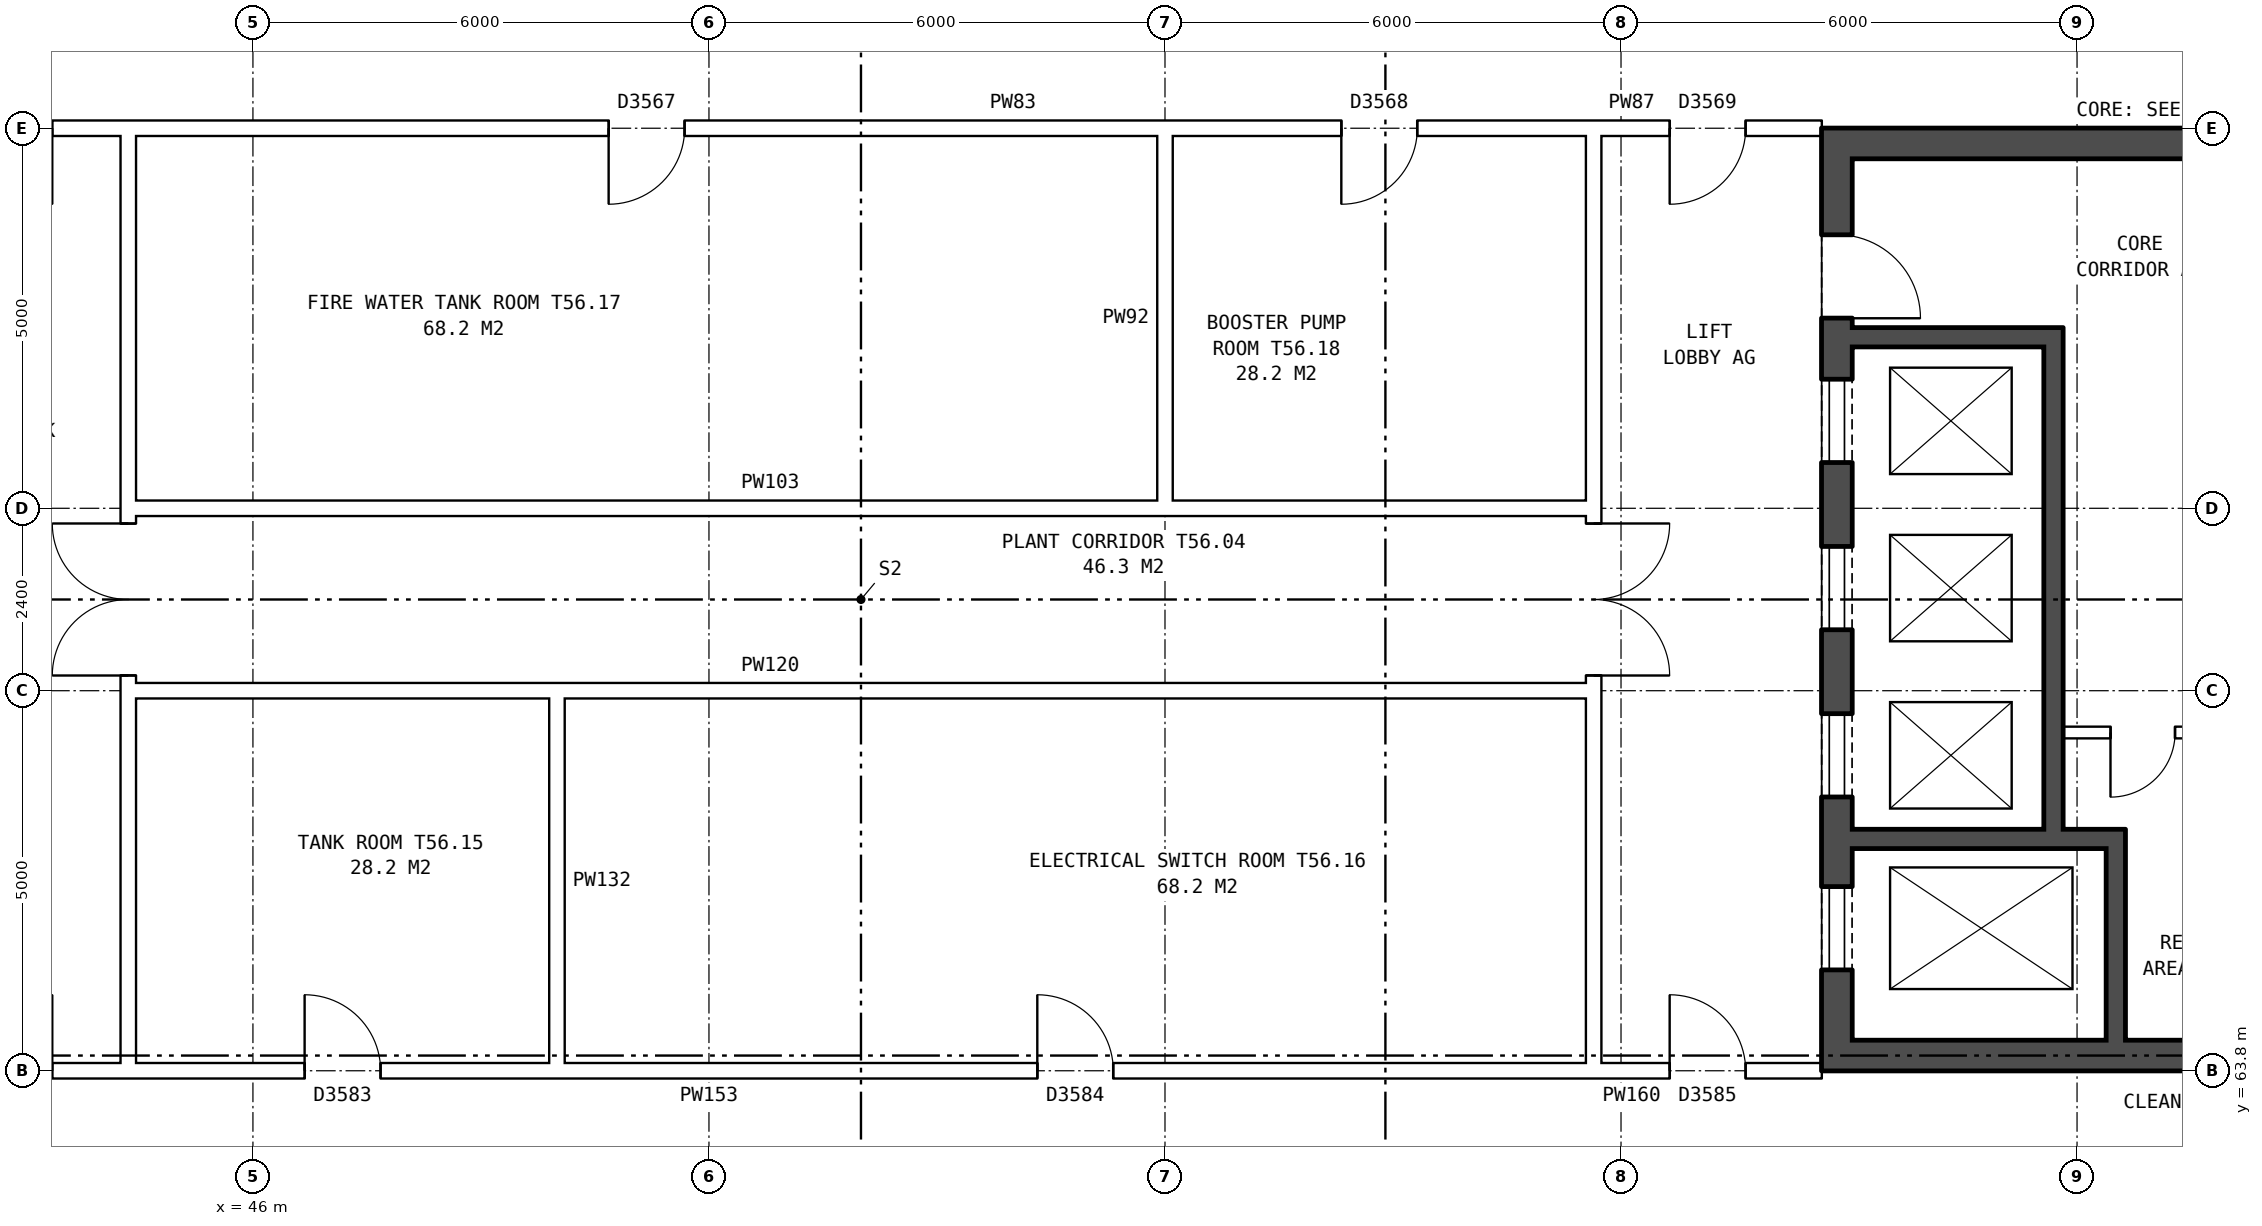
"""IFC4 building model, lengths in metres.
Left out: names, types, materials, properties, quantities, classifications, styles, units other than length and angle.
Written with IfcOpenShell. Run it as: python <this file> out.ifc"""

import sys

from ifc_helpers import new_model, si_unit, direction, frame, frame_2d, origin, place, context, subcontext, project, spatial, rectangle, extrude, element, fill, save


model = new_model("IFC4")
c1 = context("Model", 3, precision=1e-05, world=origin(), true_north=direction((0.0, 1.0)))
c2 = subcontext(c1, "Body", "Model", "MODEL_VIEW")
j1 = project(units=[si_unit("LENGTHUNIT", "METRE"), si_unit("PLANEANGLEUNIT", "RADIAN")], contexts=[c1])
p1 = place(None, origin())
s1 = spatial("IfcSite", under=j1, at=p1, CompositionType="ELEMENT")
p2 = place(p1, origin())
s2 = spatial("IfcBuilding", under=s1, at=p2, CompositionType="ELEMENT")
p3 = place(p2, frame((0.0, 0.0, 198.6)))
s3 = spatial("IfcBuildingStorey", under=s2, at=p3, CompositionType="ELEMENT", Elevation=198.6)
p4 = place(p3, frame((66.84, 63.8, 0.0), z_axis=(0.0, 0.0, 1.0), x_axis=(0.0, 1.0, 0.0)))
e1 = element("IfcWall", 1, at=p4, inside=s3, PredefinedType="SHEAR", context=c2, shape_type="SweptSolid", body=[
    extrude(rectangle(XDim=12.4, YDim=0.4, at=frame_2d((6.2, 0.0))), origin(), (0.0, 0.0, 1.0), 3.7),
])
p5 = place(p4, frame((1.325, 0.0, 0.0)))
e2 = element("IfcOpeningElement", 2, at=p5, cuts=e1, PredefinedType="OPENING", context=c2, shape_type="SweptSolid", body=[
    extrude(rectangle(XDim=1.1, YDim=2.1, at=frame_2d((0.55, 1.05))), frame((0.0, 0.21, 0.0), z_axis=(0.0, -1.0, 0.0), x_axis=(1.0, 0.0, 0.0)), (0.0, 0.0, 1.0), 0.42),
])
p6 = place(p4, frame((3.6, 0.0, 0.0)))
e3 = element("IfcOpeningElement", 3, at=p6, cuts=e1, PredefinedType="OPENING", context=c2, shape_type="SweptSolid", body=[
    extrude(rectangle(XDim=1.1, YDim=2.1, at=frame_2d((0.55, 1.05))), frame((0.0, 0.21, 0.0), z_axis=(0.0, -1.0, 0.0), x_axis=(1.0, 0.0, 0.0)), (0.0, 0.0, 1.0), 0.42),
])
p7 = place(p4, frame((5.8, 0.0, 0.0)))
e4 = element("IfcOpeningElement", 4, at=p7, cuts=e1, PredefinedType="OPENING", context=c2, shape_type="SweptSolid", body=[
    extrude(rectangle(XDim=1.1, YDim=2.1, at=frame_2d((0.55, 1.05))), frame((0.0, 0.21, 0.0), z_axis=(0.0, -1.0, 0.0), x_axis=(1.0, 0.0, 0.0)), (0.0, 0.0, 1.0), 0.42),
])
p8 = place(p4, frame((8.0, 0.0, 0.0)))
e5 = element("IfcOpeningElement", 5, at=p8, cuts=e1, PredefinedType="OPENING", context=c2, shape_type="SweptSolid", body=[
    extrude(rectangle(XDim=1.1, YDim=2.1, at=frame_2d((0.55, 1.05))), frame((0.0, 0.21, 0.0), z_axis=(0.0, -1.0, 0.0), x_axis=(1.0, 0.0, 0.0)), (0.0, 0.0, 1.0), 0.42),
])
p9 = place(p4, frame((9.9, 0.0, 0.0)))
e6 = element("IfcOpeningElement", 6, at=p9, cuts=e1, PredefinedType="OPENING", context=c2, shape_type="SweptSolid", body=[
    extrude(rectangle(XDim=1.1, YDim=2.1, at=frame_2d((0.55, 1.05))), frame((0.0, 0.21, 0.0), z_axis=(0.0, -1.0, 0.0), x_axis=(1.0, 0.0, 0.0)), (0.0, 0.0, 1.0), 0.42),
])
for number, where, z_axis, x_axis in (
    (7, (67.04, 64.0, 0.0), (0.0, 0.0, 1.0), (1.0, 0.0, 0.0)),
    (8, (67.04, 76.0, 0.0), (0.0, 0.0, 1.0), (1.0, 0.0, 0.0)),
):
    element("IfcWall", number, at=place(p3, frame(where, z_axis=z_axis, x_axis=x_axis)), inside=s3, PredefinedType="SHEAR", context=c2, shape_type="SweptSolid", body=[
        extrude(rectangle(XDim=8.2, YDim=0.4, at=frame_2d((4.1, 0.0))), origin(), (0.0, 0.0, 1.0), 3.7),
    ])
p10 = place(p3, frame((67.04, 66.85, 0.0), z_axis=(0.0, 0.0, 1.0), x_axis=(1.0, 0.0, 0.0)))
e9 = element("IfcWall", 9, at=p10, inside=s3, PredefinedType="SHEAR", context=c2, shape_type="SweptSolid", body=[
    extrude(rectangle(XDim=3.595, YDim=0.25, at=frame_2d((1.797, 0.0))), origin(), (0.0, 0.0, 1.0), 3.7),
])
p11 = place(p3, frame((69.815, 68.25, 0.0), z_axis=(0.0, 0.0, 1.0), x_axis=(1.0, 0.0, 0.0)))
e10 = element("IfcWall", 10, at=p11, inside=s3, PredefinedType="PARTITIONING", context=c2, shape_type="SweptSolid", body=[
    extrude(rectangle(XDim=2.1, YDim=0.15, at=frame_2d((1.05, 0.0))), origin(), (0.0, 0.0, 1.0), 3.7),
])
p12 = place(p11, frame((0.625, 0.0, 0.0)))
e11 = element("IfcOpeningElement", 11, at=p12, cuts=e10, PredefinedType="OPENING", context=c2, shape_type="SweptSolid", body=[
    extrude(rectangle(XDim=0.85, YDim=2.1, at=frame_2d((0.425, 1.05))), frame((0.0, 0.085, 0.0), z_axis=(0.0, -1.0, 0.0), x_axis=(1.0, 0.0, 0.0)), (0.0, 0.0, 1.0), 0.17),
])
p13 = place(p3, frame((67.04, 73.45, 0.0), z_axis=(0.0, 0.0, 1.0), x_axis=(1.0, 0.0, 0.0)))
e12 = element("IfcWall", 12, at=p13, inside=s3, PredefinedType="SHEAR", context=c2, shape_type="SweptSolid", body=[
    extrude(rectangle(XDim=2.525, YDim=0.25, at=frame_2d((1.262, 0.0))), origin(), (0.0, 0.0, 1.0), 3.7),
])
p14 = place(p3, frame((69.69, 66.975, 0.0), z_axis=(0.0, 0.0, 1.0), x_axis=(0.0, 1.0, 0.0)))
e13 = element("IfcWall", 13, at=p14, inside=s3, PredefinedType="SHEAR", context=c2, shape_type="SweptSolid", body=[
    extrude(rectangle(XDim=6.6, YDim=0.25, at=frame_2d((3.3, 0.0))), origin(), (0.0, 0.0, 1.0), 3.7),
])
p15 = place(p3, frame((70.51, 64.2, 0.0), z_axis=(0.0, 0.0, 1.0), x_axis=(0.0, 1.0, 0.0)))
e14 = element("IfcWall", 14, at=p15, inside=s3, PredefinedType="SHEAR", context=c2, shape_type="SweptSolid", body=[
    extrude(rectangle(XDim=2.525, YDim=0.25, at=frame_2d((1.263, 0.0))), origin(), (0.0, 0.0, 1.0), 3.7),
])
p16 = place(p3, frame((63.64, 63.9, 0.0), z_axis=(0.0, 0.0, 1.0), x_axis=(0.0, 1.0, 0.0)))
e15 = element("IfcWall", 15, at=p16, inside=s3, PredefinedType="PARTITIONING", context=c2, shape_type="SweptSolid", body=[
    extrude(rectangle(XDim=12.2, YDim=0.2, at=frame_2d((6.1, 0.0))), origin(), (0.0, 0.0, 1.0), 3.7),
])
p17 = place(p16, frame((5.1, 0.0, 0.0)))
e16 = element("IfcOpeningElement", 16, at=p17, cuts=e15, PredefinedType="OPENING", context=c2, shape_type="SweptSolid", body=[
    extrude(rectangle(XDim=2.0, YDim=2.1, at=frame_2d((1.0, 1.05))), frame((0.0, 0.11, 0.0), z_axis=(0.0, -1.0, 0.0), x_axis=(1.0, 0.0, 0.0)), (0.0, 0.0, 1.0), 0.22),
])
p18 = place(p3, frame((44.36, 63.9, 0.0), z_axis=(0.0, 0.0, 1.0), x_axis=(0.0, 1.0, 0.0)))
e17 = element("IfcWall", 17, at=p18, inside=s3, PredefinedType="PARTITIONING", context=c2, shape_type="SweptSolid", body=[
    extrude(rectangle(XDim=12.2, YDim=0.2, at=frame_2d((6.1, 0.0))), origin(), (0.0, 0.0, 1.0), 3.7),
])
p19 = place(p18, frame((5.1, 0.0, 0.0)))
e18 = element("IfcOpeningElement", 18, at=p19, cuts=e17, PredefinedType="OPENING", context=c2, shape_type="SweptSolid", body=[
    extrude(rectangle(XDim=2.0, YDim=2.1, at=frame_2d((1.0, 1.05))), frame((0.0, 0.11, 0.0), z_axis=(0.0, -1.0, 0.0), x_axis=(1.0, 0.0, 0.0)), (0.0, 0.0, 1.0), 0.22),
])
p20 = place(p3, frame((44.36, 63.8, 0.0), z_axis=(0.0, 0.0, 1.0), x_axis=(1.0, 0.0, 0.0)))
e19 = element("IfcWall", 19, at=p20, inside=s3, PredefinedType="PARTITIONING", context=c2, shape_type="SweptSolid", body=[
    extrude(rectangle(XDim=19.28, YDim=0.2, at=frame_2d((9.64, 0.0))), origin(), (0.0, 0.0, 1.0), 3.7),
])
p21 = place(p20, frame((2.32, 0.0, 0.0)))
e20 = element("IfcOpeningElement", 20, at=p21, cuts=e19, PredefinedType="OPENING", context=c2, shape_type="SweptSolid", body=[
    extrude(rectangle(XDim=1.0, YDim=2.1, at=frame_2d((0.5, 1.05))), frame((0.0, 0.11, 0.0), z_axis=(0.0, -1.0, 0.0), x_axis=(1.0, 0.0, 0.0)), (0.0, 0.0, 1.0), 0.22),
])
p22 = place(p20, frame((11.96, 0.0, 0.0)))
e21 = element("IfcOpeningElement", 21, at=p22, cuts=e19, PredefinedType="OPENING", context=c2, shape_type="SweptSolid", body=[
    extrude(rectangle(XDim=1.0, YDim=2.1, at=frame_2d((0.5, 1.05))), frame((0.0, 0.11, 0.0), z_axis=(0.0, -1.0, 0.0), x_axis=(1.0, 0.0, 0.0)), (0.0, 0.0, 1.0), 0.22),
])
p23 = place(p3, frame((41.36, 63.8, 0.0), z_axis=(0.0, 0.0, 1.0), x_axis=(1.0, 0.0, 0.0)))
e22 = element("IfcWall", 22, at=p23, inside=s3, PredefinedType="PARTITIONING", context=c2, shape_type="SweptSolid", body=[
    extrude(rectangle(XDim=3.0, YDim=0.2, at=frame_2d((1.5, 0.0))), origin(), (0.0, 0.0, 1.0), 3.7),
])
p24 = place(p23, frame((1.0, 0.0, 0.0)))
e23 = element("IfcOpeningElement", 23, at=p24, cuts=e22, PredefinedType="OPENING", context=c2, shape_type="SweptSolid", body=[
    extrude(rectangle(XDim=1.0, YDim=2.1, at=frame_2d((0.5, 1.05))), frame((0.0, 0.11, 0.0), z_axis=(0.0, -1.0, 0.0), x_axis=(1.0, 0.0, 0.0)), (0.0, 0.0, 1.0), 0.22),
])
p25 = place(p3, frame((63.64, 63.8, 0.0), z_axis=(0.0, 0.0, 1.0), x_axis=(1.0, 0.0, 0.0)))
e24 = element("IfcWall", 24, at=p25, inside=s3, PredefinedType="PARTITIONING", context=c2, shape_type="SweptSolid", body=[
    extrude(rectangle(XDim=3.0, YDim=0.2, at=frame_2d((1.5, 0.0))), origin(), (0.0, 0.0, 1.0), 3.7),
])
p26 = place(p25, frame((1.0, 0.0, 0.0)))
e25 = element("IfcOpeningElement", 25, at=p26, cuts=e24, PredefinedType="OPENING", context=c2, shape_type="SweptSolid", body=[
    extrude(rectangle(XDim=1.0, YDim=2.1, at=frame_2d((0.5, 1.05))), frame((0.0, 0.11, 0.0), z_axis=(0.0, -1.0, 0.0), x_axis=(1.0, 0.0, 0.0)), (0.0, 0.0, 1.0), 0.22),
])
for number, where, z_axis, x_axis in (
    (26, (44.36, 68.8, 0.0), (0.0, 0.0, 1.0), (1.0, 0.0, 0.0)),
    (27, (44.36, 71.2, 0.0), (0.0, 0.0, 1.0), (1.0, 0.0, 0.0)),
):
    element("IfcWall", number, at=place(p3, frame(where, z_axis=z_axis, x_axis=x_axis)), inside=s3, PredefinedType="PARTITIONING", context=c2, shape_type="SweptSolid", body=[
        extrude(rectangle(XDim=19.28, YDim=0.2, at=frame_2d((9.64, 0.0))), origin(), (0.0, 0.0, 1.0), 3.7),
    ])
p27 = place(p3, frame((44.36, 76.2, 0.0), z_axis=(0.0, 0.0, 1.0), x_axis=(1.0, 0.0, 0.0)))
e28 = element("IfcWall", 28, at=p27, inside=s3, PredefinedType="PARTITIONING", context=c2, shape_type="SweptSolid", body=[
    extrude(rectangle(XDim=19.28, YDim=0.2, at=frame_2d((9.64, 0.0))), origin(), (0.0, 0.0, 1.0), 3.7),
])
p28 = place(p27, frame((6.32, 0.0, 0.0)))
e29 = element("IfcOpeningElement", 29, at=p28, cuts=e28, PredefinedType="OPENING", context=c2, shape_type="SweptSolid", body=[
    extrude(rectangle(XDim=1.0, YDim=2.1, at=frame_2d((0.5, 1.05))), frame((0.0, 0.11, 0.0), z_axis=(0.0, -1.0, 0.0), x_axis=(1.0, 0.0, 0.0)), (0.0, 0.0, 1.0), 0.22),
])
p29 = place(p27, frame((15.96, 0.0, 0.0)))
e30 = element("IfcOpeningElement", 30, at=p29, cuts=e28, PredefinedType="OPENING", context=c2, shape_type="SweptSolid", body=[
    extrude(rectangle(XDim=1.0, YDim=2.1, at=frame_2d((0.5, 1.05))), frame((0.0, 0.11, 0.0), z_axis=(0.0, -1.0, 0.0), x_axis=(1.0, 0.0, 0.0)), (0.0, 0.0, 1.0), 0.22),
])
p30 = place(p3, frame((41.36, 76.2, 0.0), z_axis=(0.0, 0.0, 1.0), x_axis=(1.0, 0.0, 0.0)))
e31 = element("IfcWall", 31, at=p30, inside=s3, PredefinedType="PARTITIONING", context=c2, shape_type="SweptSolid", body=[
    extrude(rectangle(XDim=3.0, YDim=0.2, at=frame_2d((1.5, 0.0))), origin(), (0.0, 0.0, 1.0), 3.7),
])
p31 = place(p30, frame((1.0, 0.0, 0.0)))
e32 = element("IfcOpeningElement", 32, at=p31, cuts=e31, PredefinedType="OPENING", context=c2, shape_type="SweptSolid", body=[
    extrude(rectangle(XDim=1.0, YDim=2.1, at=frame_2d((0.5, 1.05))), frame((0.0, 0.11, 0.0), z_axis=(0.0, -1.0, 0.0), x_axis=(1.0, 0.0, 0.0)), (0.0, 0.0, 1.0), 0.22),
])
p32 = place(p3, frame((63.64, 76.2, 0.0), z_axis=(0.0, 0.0, 1.0), x_axis=(1.0, 0.0, 0.0)))
e33 = element("IfcWall", 33, at=p32, inside=s3, PredefinedType="PARTITIONING", context=c2, shape_type="SweptSolid", body=[
    extrude(rectangle(XDim=3.0, YDim=0.2, at=frame_2d((1.5, 0.0))), origin(), (0.0, 0.0, 1.0), 3.7),
])
p33 = place(p32, frame((1.0, 0.0, 0.0)))
e34 = element("IfcOpeningElement", 34, at=p33, cuts=e33, PredefinedType="OPENING", context=c2, shape_type="SweptSolid", body=[
    extrude(rectangle(XDim=1.0, YDim=2.1, at=frame_2d((0.5, 1.05))), frame((0.0, 0.11, 0.0), z_axis=(0.0, -1.0, 0.0), x_axis=(1.0, 0.0, 0.0)), (0.0, 0.0, 1.0), 0.22),
])
for number, where, z_axis, x_axis in (
    (35, (50.0, 63.7, 0.0), (0.0, 0.0, 1.0), (0.0, 1.0, 0.0)),
    (36, (58.0, 71.1, 0.0), (0.0, 0.0, 1.0), (0.0, 1.0, 0.0)),
):
    element("IfcWall", number, at=place(p3, frame(where, z_axis=z_axis, x_axis=x_axis)), inside=s3, PredefinedType="PARTITIONING", context=c2, shape_type="SweptSolid", body=[
        extrude(rectangle(XDim=5.2, YDim=0.2, at=frame_2d((2.6, 0.0))), origin(), (0.0, 0.0, 1.0), 3.7),
    ])
p34 = place(p5, origin())
e37 = element("IfcDoor", 37, at=p34, inside=s3, OperationType="DOUBLE_DOOR_SLIDING", PredefinedType="DOOR", context=c2, shape_type="SweptSolid", body=[
    extrude(rectangle(XDim=1.1, YDim=2.1, at=frame_2d((0.55, 1.05))), frame((0.0, -0.135, 0.0), z_axis=(0.0, -1.0, 0.0), x_axis=(1.0, 0.0, 0.0)), (0.0, 0.0, 1.0), 0.05),
])
fill(e2, e37)
p35 = place(p6, origin())
e38 = element("IfcDoor", 38, at=p35, inside=s3, OperationType="DOUBLE_DOOR_SLIDING", PredefinedType="DOOR", context=c2, shape_type="SweptSolid", body=[
    extrude(rectangle(XDim=1.1, YDim=2.1, at=frame_2d((0.55, 1.05))), frame((0.0, -0.135, 0.0), z_axis=(0.0, -1.0, 0.0), x_axis=(1.0, 0.0, 0.0)), (0.0, 0.0, 1.0), 0.05),
])
fill(e3, e38)
p36 = place(p7, origin())
e39 = element("IfcDoor", 39, at=p36, inside=s3, OperationType="DOUBLE_DOOR_SLIDING", PredefinedType="DOOR", context=c2, shape_type="SweptSolid", body=[
    extrude(rectangle(XDim=1.1, YDim=2.1, at=frame_2d((0.55, 1.05))), frame((0.0, -0.135, 0.0), z_axis=(0.0, -1.0, 0.0), x_axis=(1.0, 0.0, 0.0)), (0.0, 0.0, 1.0), 0.05),
])
fill(e4, e39)
p37 = place(p8, origin())
e40 = element("IfcDoor", 40, at=p37, inside=s3, OperationType="DOUBLE_DOOR_SLIDING", PredefinedType="DOOR", context=c2, shape_type="SweptSolid", body=[
    extrude(rectangle(XDim=1.1, YDim=2.1, at=frame_2d((0.55, 1.05))), frame((0.0, -0.135, 0.0), z_axis=(0.0, -1.0, 0.0), x_axis=(1.0, 0.0, 0.0)), (0.0, 0.0, 1.0), 0.05),
])
fill(e5, e40)
p38 = place(p9, frame((1.1, 0.0, 0.0), z_axis=(0.0, 0.0, 1.0), x_axis=(-1.0, 0.0, 0.0)))
e41 = element("IfcDoor", 41, at=p38, inside=s3, OperationType="SINGLE_SWING_RIGHT", PredefinedType="DOOR", context=c2, shape_type="SweptSolid", body=[
    extrude(rectangle(XDim=1.1, YDim=2.1, at=frame_2d((0.55, 1.05))), frame((0.0, 0.185, 0.0), z_axis=(0.0, -1.0, 0.0), x_axis=(1.0, 0.0, 0.0)), (0.0, 0.0, 1.0), 0.05),
])
fill(e6, e41)
p39 = place(p12, frame((0.85, 0.0, 0.0), z_axis=(0.0, 0.0, 1.0), x_axis=(-1.0, 0.0, 0.0)))
e42 = element("IfcDoor", 42, at=p39, inside=s3, OperationType="SINGLE_SWING_RIGHT", PredefinedType="DOOR", context=c2, shape_type="SweptSolid", body=[
    extrude(rectangle(XDim=0.85, YDim=2.1, at=frame_2d((0.425, 1.05))), frame((0.0, 0.025, 0.0), z_axis=(0.0, -1.0, 0.0), x_axis=(1.0, 0.0, 0.0)), (0.0, 0.0, 1.0), 0.05),
])
fill(e11, e42)
p40 = place(p17, frame((2.0, 0.0, 0.0), z_axis=(0.0, 0.0, 1.0), x_axis=(-1.0, 0.0, 0.0)))
e43 = element("IfcDoor", 43, at=p40, inside=s3, OperationType="DOUBLE_DOOR_SINGLE_SWING", PredefinedType="DOOR", context=c2, shape_type="SweptSolid", body=[
    extrude(rectangle(XDim=2.0, YDim=2.1, at=frame_2d((1.0, 1.05))), frame((0.0, 0.025, 0.0), z_axis=(0.0, -1.0, 0.0), x_axis=(1.0, 0.0, 0.0)), (0.0, 0.0, 1.0), 0.05),
])
fill(e16, e43)
p41 = place(p19, origin())
e44 = element("IfcDoor", 44, at=p41, inside=s3, OperationType="DOUBLE_DOOR_SINGLE_SWING", PredefinedType="DOOR", context=c2, shape_type="SweptSolid", body=[
    extrude(rectangle(XDim=2.0, YDim=2.1, at=frame_2d((1.0, 1.05))), frame((0.0, 0.025, 0.0), z_axis=(0.0, -1.0, 0.0), x_axis=(1.0, 0.0, 0.0)), (0.0, 0.0, 1.0), 0.05),
])
fill(e18, e44)
p42 = place(p21, origin())
e45 = element("IfcDoor", 45, at=p42, inside=s3, OperationType="SINGLE_SWING_LEFT", PredefinedType="DOOR", context=c2, shape_type="SweptSolid", body=[
    extrude(rectangle(XDim=1.0, YDim=2.1, at=frame_2d((0.5, 1.05))), frame((0.0, 0.025, 0.0), z_axis=(0.0, -1.0, 0.0), x_axis=(1.0, 0.0, 0.0)), (0.0, 0.0, 1.0), 0.05),
])
fill(e20, e45)
p43 = place(p22, origin())
e46 = element("IfcDoor", 46, at=p43, inside=s3, OperationType="SINGLE_SWING_LEFT", PredefinedType="DOOR", context=c2, shape_type="SweptSolid", body=[
    extrude(rectangle(XDim=1.0, YDim=2.1, at=frame_2d((0.5, 1.05))), frame((0.0, 0.025, 0.0), z_axis=(0.0, -1.0, 0.0), x_axis=(1.0, 0.0, 0.0)), (0.0, 0.0, 1.0), 0.05),
])
fill(e21, e46)
p44 = place(p26, origin())
e47 = element("IfcDoor", 47, at=p44, inside=s3, OperationType="SINGLE_SWING_LEFT", PredefinedType="DOOR", context=c2, shape_type="SweptSolid", body=[
    extrude(rectangle(XDim=1.0, YDim=2.1, at=frame_2d((0.5, 1.05))), frame((0.0, 0.025, 0.0), z_axis=(0.0, -1.0, 0.0), x_axis=(1.0, 0.0, 0.0)), (0.0, 0.0, 1.0), 0.05),
])
fill(e25, e47)
p45 = place(p28, frame((1.0, 0.0, 0.0), z_axis=(0.0, 0.0, 1.0), x_axis=(-1.0, 0.0, 0.0)))
e48 = element("IfcDoor", 48, at=p45, inside=s3, OperationType="SINGLE_SWING_RIGHT", PredefinedType="DOOR", context=c2, shape_type="SweptSolid", body=[
    extrude(rectangle(XDim=1.0, YDim=2.1, at=frame_2d((0.5, 1.05))), frame((0.0, 0.025, 0.0), z_axis=(0.0, -1.0, 0.0), x_axis=(1.0, 0.0, 0.0)), (0.0, 0.0, 1.0), 0.05),
])
fill(e29, e48)
p46 = place(p29, frame((1.0, 0.0, 0.0), z_axis=(0.0, 0.0, 1.0), x_axis=(-1.0, 0.0, 0.0)))
e49 = element("IfcDoor", 49, at=p46, inside=s3, OperationType="SINGLE_SWING_RIGHT", PredefinedType="DOOR", context=c2, shape_type="SweptSolid", body=[
    extrude(rectangle(XDim=1.0, YDim=2.1, at=frame_2d((0.5, 1.05))), frame((0.0, 0.025, 0.0), z_axis=(0.0, -1.0, 0.0), x_axis=(1.0, 0.0, 0.0)), (0.0, 0.0, 1.0), 0.05),
])
fill(e30, e49)
p47 = place(p33, frame((1.0, 0.0, 0.0), z_axis=(0.0, 0.0, 1.0), x_axis=(-1.0, 0.0, 0.0)))
e50 = element("IfcDoor", 50, at=p47, inside=s3, OperationType="SINGLE_SWING_RIGHT", PredefinedType="DOOR", context=c2, shape_type="SweptSolid", body=[
    extrude(rectangle(XDim=1.0, YDim=2.1, at=frame_2d((0.5, 1.05))), frame((0.0, 0.025, 0.0), z_axis=(0.0, -1.0, 0.0), x_axis=(1.0, 0.0, 0.0)), (0.0, 0.0, 1.0), 0.05),
])
fill(e34, e50)
save(model, sys.argv[1])
